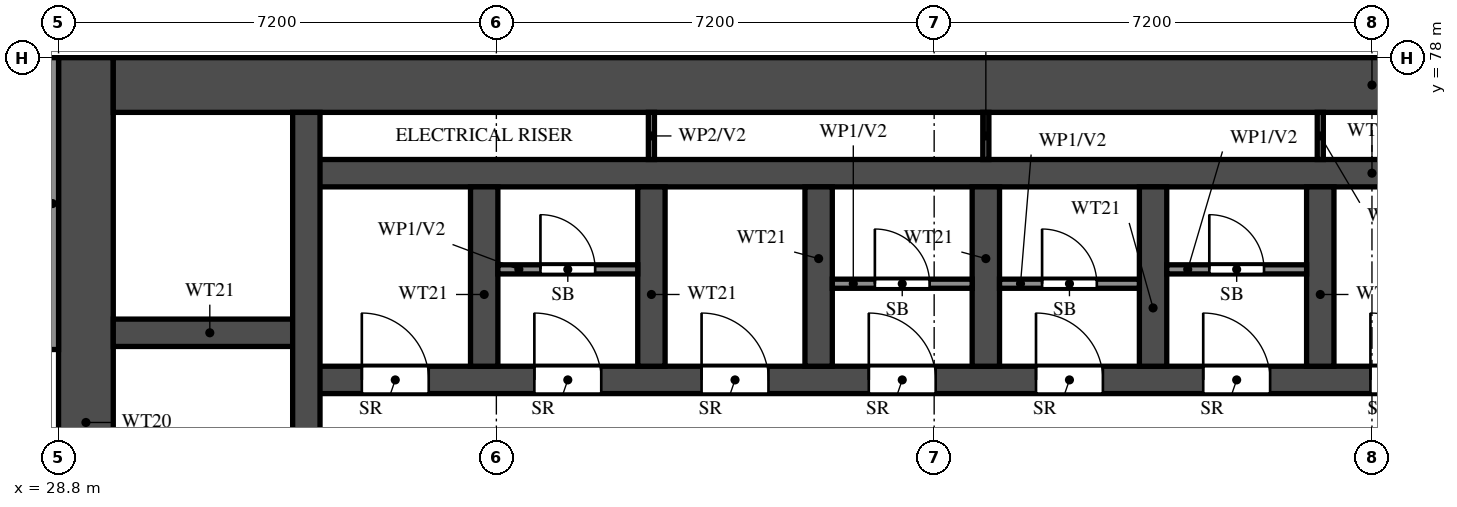
"""IFC4 building model, lengths in metres.
Left out: names, types, materials, properties, quantities, classifications, styles, units other than length and angle.
Written with IfcOpenShell. Run it as: python <this file> out.ifc"""

import sys

from ifc_helpers import new_model, si_unit, direction, frame, frame_2d, origin, place, context, subcontext, project, spatial, rectangle, extrude, element, fill, save


model = new_model("IFC4")
c1 = context("Model", 3, precision=1e-05, world=origin(), true_north=direction((0.0, 1.0)))
c2 = subcontext(c1, "Body", "Model", "MODEL_VIEW")
j1 = project(units=[si_unit("LENGTHUNIT", "METRE"), si_unit("PLANEANGLEUNIT", "RADIAN")], contexts=[c1])
p1 = place(None, origin())
s1 = spatial("IfcSite", under=j1, at=p1, CompositionType="ELEMENT")
p2 = place(p1, origin())
s2 = spatial("IfcBuilding", under=s1, at=p2, CompositionType="ELEMENT")
p3 = place(p2, frame((0.0, 0.0, 79.5)))
s3 = spatial("IfcBuildingStorey", under=s2, at=p3, CompositionType="ELEMENT", Elevation=79.5)
p4 = place(p3, frame((29.25, 66.0, 0.0), z_axis=(0.0, 0.0, 1.0), x_axis=(0.0, 1.0, 0.0)))
e1 = element("IfcWall", 1, at=p4, inside=s3, PredefinedType="SHEAR", context=c2, shape_type="SweptSolid", body=[
    extrude(rectangle(XDim=12.0, YDim=0.9, at=frame_2d((6.0, 0.0))), origin(), (0.0, 0.0, 1.0), 3.18),
])
p5 = place(p3, frame((29.7, 77.55, 0.0), z_axis=(0.0, 0.0, 1.0), x_axis=(1.0, 0.0, 0.0)))
e2 = element("IfcWall", 2, at=p5, inside=s3, PredefinedType="SHEAR", context=c2, shape_type="SweptSolid", body=[
    extrude(rectangle(XDim=41.4, YDim=0.9, at=frame_2d((20.7, 0.0))), origin(), (0.0, 0.0, 1.0), 3.18),
])
p6 = place(p3, frame((32.875, 72.7, 0.0), z_axis=(0.0, 0.0, 1.0), x_axis=(1.0, 0.0, 0.0)))
e3 = element("IfcWall", 3, at=p6, inside=s3, PredefinedType="SHEAR", context=c2, shape_type="SweptSolid", body=[
    extrude(rectangle(XDim=35.05, YDim=0.45, at=frame_2d((17.525, 0.0))), origin(), (0.0, 0.0, 1.0), 3.18),
])
p7 = place(p6, frame((19.8, 0.0, 0.0)))
e4 = element("IfcOpeningElement", 4, at=p7, cuts=e3, PredefinedType="OPENING", context=c2, shape_type="SweptSolid", body=[
    extrude(rectangle(XDim=1.1, YDim=2.1, at=frame_2d((0.55, 1.05))), frame((0.0, 0.235, 0.0), z_axis=(0.0, -1.0, 0.0), x_axis=(1.0, 0.0, 0.0)), (0.0, 0.0, 1.0), 0.47),
])
p8 = place(p6, frame((27.65, 0.0, 0.0)))
e5 = element("IfcOpeningElement", 5, at=p8, cuts=e3, PredefinedType="OPENING", context=c2, shape_type="SweptSolid", body=[
    extrude(rectangle(XDim=1.1, YDim=2.1, at=frame_2d((0.55, 1.05))), frame((0.0, 0.235, 0.0), z_axis=(0.0, -1.0, 0.0), x_axis=(1.0, 0.0, 0.0)), (0.0, 0.0, 1.0), 0.47),
])
p9 = place(p6, frame((30.25, 0.0, 0.0)))
e6 = element("IfcOpeningElement", 6, at=p9, cuts=e3, PredefinedType="OPENING", context=c2, shape_type="SweptSolid", body=[
    extrude(rectangle(XDim=1.1, YDim=2.1, at=frame_2d((0.55, 1.05))), frame((0.0, 0.235, 0.0), z_axis=(0.0, -1.0, 0.0), x_axis=(1.0, 0.0, 0.0)), (0.0, 0.0, 1.0), 0.47),
])
p10 = place(p6, frame((3.75, 0.0, 0.0)))
e7 = element("IfcOpeningElement", 7, at=p10, cuts=e3, PredefinedType="OPENING", context=c2, shape_type="SweptSolid", body=[
    extrude(rectangle(XDim=1.1, YDim=2.1, at=frame_2d((0.55, 1.05))), frame((0.0, 0.235, 0.0), z_axis=(0.0, -1.0, 0.0), x_axis=(1.0, 0.0, 0.0)), (0.0, 0.0, 1.0), 0.47),
])
p11 = place(p6, frame((6.5, 0.0, 0.0)))
e8 = element("IfcOpeningElement", 8, at=p11, cuts=e3, PredefinedType="OPENING", context=c2, shape_type="SweptSolid", body=[
    extrude(rectangle(XDim=1.1, YDim=2.1, at=frame_2d((0.55, 1.05))), frame((0.0, 0.235, 0.0), z_axis=(0.0, -1.0, 0.0), x_axis=(1.0, 0.0, 0.0)), (0.0, 0.0, 1.0), 0.47),
])
p12 = place(p6, frame((9.25, 0.0, 0.0)))
e9 = element("IfcOpeningElement", 9, at=p12, cuts=e3, PredefinedType="OPENING", context=c2, shape_type="SweptSolid", body=[
    extrude(rectangle(XDim=1.1, YDim=2.1, at=frame_2d((0.55, 1.05))), frame((0.0, 0.235, 0.0), z_axis=(0.0, -1.0, 0.0), x_axis=(1.0, 0.0, 0.0)), (0.0, 0.0, 1.0), 0.47),
])
p13 = place(p6, frame((12.0, 0.0, 0.0)))
e10 = element("IfcOpeningElement", 10, at=p13, cuts=e3, PredefinedType="OPENING", context=c2, shape_type="SweptSolid", body=[
    extrude(rectangle(XDim=1.1, YDim=2.1, at=frame_2d((0.55, 1.05))), frame((0.0, 0.235, 0.0), z_axis=(0.0, -1.0, 0.0), x_axis=(1.0, 0.0, 0.0)), (0.0, 0.0, 1.0), 0.47),
])
p14 = place(p6, frame((14.75, 0.0, 0.0)))
e11 = element("IfcOpeningElement", 11, at=p14, cuts=e3, PredefinedType="OPENING", context=c2, shape_type="SweptSolid", body=[
    extrude(rectangle(XDim=1.1, YDim=2.1, at=frame_2d((0.55, 1.05))), frame((0.0, 0.235, 0.0), z_axis=(0.0, -1.0, 0.0), x_axis=(1.0, 0.0, 0.0)), (0.0, 0.0, 1.0), 0.47),
])
p15 = place(p6, frame((17.5, 0.0, 0.0)))
e12 = element("IfcOpeningElement", 12, at=p15, cuts=e3, PredefinedType="OPENING", context=c2, shape_type="SweptSolid", body=[
    extrude(rectangle(XDim=1.1, YDim=2.1, at=frame_2d((0.55, 1.05))), frame((0.0, 0.235, 0.0), z_axis=(0.0, -1.0, 0.0), x_axis=(1.0, 0.0, 0.0)), (0.0, 0.0, 1.0), 0.47),
])
p16 = place(p6, frame((0.913, 0.0, 0.0)))
e13 = element("IfcOpeningElement", 13, at=p16, cuts=e3, PredefinedType="OPENING", context=c2, shape_type="SweptSolid", body=[
    extrude(rectangle(XDim=1.1, YDim=2.1, at=frame_2d((0.55, 1.05))), frame((0.0, 0.235, 0.0), z_axis=(0.0, -1.0, 0.0), x_axis=(1.0, 0.0, 0.0)), (0.0, 0.0, 1.0), 0.47),
])
p17 = place(p3, frame((32.875, 76.1, 0.0), z_axis=(0.0, 0.0, 1.0), x_axis=(1.0, 0.0, 0.0)))
e14 = element("IfcWall", 14, at=p17, inside=s3, PredefinedType="SHEAR", context=c2, shape_type="SweptSolid", body=[
    extrude(rectangle(XDim=35.05, YDim=0.45, at=frame_2d((17.525, 0.0))), origin(), (0.0, 0.0, 1.0), 3.18),
])
p18 = place(p3, frame((29.7, 73.475, 0.0), z_axis=(0.0, 0.0, 1.0), x_axis=(1.0, 0.0, 0.0)))
e15 = element("IfcWall", 15, at=p18, inside=s3, PredefinedType="SHEAR", context=c2, shape_type="SweptSolid", body=[
    extrude(rectangle(XDim=3.175, YDim=0.45, at=frame_2d((1.587, 0.0))), origin(), (0.0, 0.0, 1.0), 3.18),
])
p19 = place(p3, frame((32.875, 66.45, 0.0), z_axis=(0.0, 0.0, 1.0), x_axis=(0.0, 1.0, 0.0)))
e16 = element("IfcWall", 16, at=p19, inside=s3, PredefinedType="SHEAR", context=c2, shape_type="SweptSolid", body=[
    extrude(rectangle(XDim=10.65, YDim=0.45, at=frame_2d((5.325, 0.0))), origin(), (0.0, 0.0, 1.0), 3.18),
])
for number, where, z_axis, x_axis in (
    (17, (35.8, 72.925, 0.0), (0.0, 0.0, 1.0), (0.0, 1.0, 0.0)),
    (18, (38.55, 72.925, 0.0), (0.0, 0.0, 1.0), (0.0, 1.0, 0.0)),
    (19, (41.3, 72.925, 0.0), (0.0, 0.0, 1.0), (0.0, 1.0, 0.0)),
    (20, (44.05, 72.925, 0.0), (0.0, 0.0, 1.0), (0.0, 1.0, 0.0)),
    (21, (46.8, 72.925, 0.0), (0.0, 0.0, 1.0), (0.0, 1.0, 0.0)),
    (22, (49.55, 72.925, 0.0), (0.0, 0.0, 1.0), (0.0, 1.0, 0.0)),
):
    element("IfcWall", number, at=place(p3, frame(where, z_axis=z_axis, x_axis=x_axis)), inside=s3, PredefinedType="SHEAR", context=c2, shape_type="SweptSolid", body=[
        extrude(rectangle(XDim=2.95, YDim=0.45, at=frame_2d((1.475, 0.0))), origin(), (0.0, 0.0, 1.0), 3.18),
    ])
p20 = place(p3, frame((36.025, 74.518, 0.0), z_axis=(0.0, 0.0, 1.0), x_axis=(1.0, 0.0, 0.0)))
e23 = element("IfcWall", 23, at=p20, inside=s3, PredefinedType="PARTITIONING", context=c2, shape_type="SweptSolid", body=[
    extrude(rectangle(XDim=2.3, YDim=0.15, at=frame_2d((1.15, 0.0))), origin(), (0.0, 0.0, 1.0), 3.18),
])
p21 = place(p20, frame((0.7, 0.0, 0.0)))
e24 = element("IfcOpeningElement", 24, at=p21, cuts=e23, PredefinedType="OPENING", context=c2, shape_type="SweptSolid", body=[
    extrude(rectangle(XDim=0.9, YDim=2.1, at=frame_2d((0.45, 1.05))), frame((0.0, 0.085, 0.0), z_axis=(0.0, -1.0, 0.0), x_axis=(1.0, 0.0, 0.0)), (0.0, 0.0, 1.0), 0.17),
])
p22 = place(p3, frame((41.525, 74.282, 0.0), z_axis=(0.0, 0.0, 1.0), x_axis=(1.0, 0.0, 0.0)))
e25 = element("IfcWall", 25, at=p22, inside=s3, PredefinedType="PARTITIONING", context=c2, shape_type="SweptSolid", body=[
    extrude(rectangle(XDim=2.3, YDim=0.15, at=frame_2d((1.15, 0.0))), origin(), (0.0, 0.0, 1.0), 3.18),
])
p23 = place(p22, frame((0.7, 0.0, 0.0)))
e26 = element("IfcOpeningElement", 26, at=p23, cuts=e25, PredefinedType="OPENING", context=c2, shape_type="SweptSolid", body=[
    extrude(rectangle(XDim=0.9, YDim=2.1, at=frame_2d((0.45, 1.05))), frame((0.0, 0.085, 0.0), z_axis=(0.0, -1.0, 0.0), x_axis=(1.0, 0.0, 0.0)), (0.0, 0.0, 1.0), 0.17),
])
p24 = place(p3, frame((44.275, 74.282, 0.0), z_axis=(0.0, 0.0, 1.0), x_axis=(1.0, 0.0, 0.0)))
e27 = element("IfcWall", 27, at=p24, inside=s3, PredefinedType="PARTITIONING", context=c2, shape_type="SweptSolid", body=[
    extrude(rectangle(XDim=2.3, YDim=0.15, at=frame_2d((1.15, 0.0))), origin(), (0.0, 0.0, 1.0), 3.18),
])
p25 = place(p24, frame((0.7, 0.0, 0.0)))
e28 = element("IfcOpeningElement", 28, at=p25, cuts=e27, PredefinedType="OPENING", context=c2, shape_type="SweptSolid", body=[
    extrude(rectangle(XDim=0.9, YDim=2.1, at=frame_2d((0.45, 1.05))), frame((0.0, 0.085, 0.0), z_axis=(0.0, -1.0, 0.0), x_axis=(1.0, 0.0, 0.0)), (0.0, 0.0, 1.0), 0.17),
])
p26 = place(p3, frame((47.025, 74.518, 0.0), z_axis=(0.0, 0.0, 1.0), x_axis=(1.0, 0.0, 0.0)))
e29 = element("IfcWall", 29, at=p26, inside=s3, PredefinedType="PARTITIONING", context=c2, shape_type="SweptSolid", body=[
    extrude(rectangle(XDim=2.3, YDim=0.15, at=frame_2d((1.15, 0.0))), origin(), (0.0, 0.0, 1.0), 3.18),
])
p27 = place(p26, frame((0.7, 0.0, 0.0)))
e30 = element("IfcOpeningElement", 30, at=p27, cuts=e29, PredefinedType="OPENING", context=c2, shape_type="SweptSolid", body=[
    extrude(rectangle(XDim=0.9, YDim=2.1, at=frame_2d((0.45, 1.05))), frame((0.0, 0.085, 0.0), z_axis=(0.0, -1.0, 0.0), x_axis=(1.0, 0.0, 0.0)), (0.0, 0.0, 1.0), 0.17),
])
for number, where, z_axis, x_axis in (
    (31, (38.55, 76.325, 0.0), (0.0, 0.0, 1.0), (0.0, 1.0, 0.0)),
    (32, (44.05, 76.325, 0.0), (0.0, 0.0, 1.0), (0.0, 1.0, 0.0)),
    (33, (49.55, 76.325, 0.0), (0.0, 0.0, 1.0), (0.0, 1.0, 0.0)),
):
    element("IfcWall", number, at=place(p3, frame(where, z_axis=z_axis, x_axis=x_axis)), inside=s3, PredefinedType="PARTITIONING", context=c2, shape_type="SweptSolid", body=[
        extrude(rectangle(XDim=0.775, YDim=0.1, at=frame_2d((0.388, 0.0))), origin(), (0.0, 0.0, 1.0), 3.18),
    ])
p28 = place(p3, frame((28.7, 73.2, 0.0), z_axis=(0.0, 0.0, 1.0), x_axis=(0.0, 1.0, 0.0)))
e34 = element("IfcWall", 34, at=p28, inside=s3, PredefinedType="SOLIDWALL", context=c2, shape_type="SweptSolid", body=[
    extrude(rectangle(XDim=4.8, YDim=0.2, at=frame_2d((2.4, 0.0))), origin(), (0.0, 0.0, 1.0), 3.18),
])
p29 = place(p10, origin())
e35 = element("IfcDoor", 35, at=p29, inside=s3, OperationType="SINGLE_SWING_LEFT", PredefinedType="DOOR", context=c2, shape_type="SweptSolid", body=[
    extrude(rectangle(XDim=1.1, YDim=2.1, at=frame_2d((0.55, 1.05))), frame((0.0, 0.025, 0.0), z_axis=(0.0, -1.0, 0.0), x_axis=(1.0, 0.0, 0.0)), (0.0, 0.0, 1.0), 0.05),
])
fill(e7, e35)
p30 = place(p21, origin())
e36 = element("IfcDoor", 36, at=p30, inside=s3, OperationType="SINGLE_SWING_RIGHT", PredefinedType="DOOR", context=c2, shape_type="SweptSolid", body=[
    extrude(rectangle(XDim=0.9, YDim=2.1, at=frame_2d((0.45, 1.05))), frame((0.0, 0.025, 0.0), z_axis=(0.0, -1.0, 0.0), x_axis=(1.0, 0.0, 0.0)), (0.0, 0.0, 1.0), 0.05),
])
fill(e24, e36)
p31 = place(p11, origin())
e37 = element("IfcDoor", 37, at=p31, inside=s3, OperationType="SINGLE_SWING_LEFT", PredefinedType="DOOR", context=c2, shape_type="SweptSolid", body=[
    extrude(rectangle(XDim=1.1, YDim=2.1, at=frame_2d((0.55, 1.05))), frame((0.0, 0.025, 0.0), z_axis=(0.0, -1.0, 0.0), x_axis=(1.0, 0.0, 0.0)), (0.0, 0.0, 1.0), 0.05),
])
fill(e8, e37)
p32 = place(p12, origin())
e38 = element("IfcDoor", 38, at=p32, inside=s3, OperationType="SINGLE_SWING_LEFT", PredefinedType="DOOR", context=c2, shape_type="SweptSolid", body=[
    extrude(rectangle(XDim=1.1, YDim=2.1, at=frame_2d((0.55, 1.05))), frame((0.0, 0.025, 0.0), z_axis=(0.0, -1.0, 0.0), x_axis=(1.0, 0.0, 0.0)), (0.0, 0.0, 1.0), 0.05),
])
fill(e9, e38)
p33 = place(p23, origin())
e39 = element("IfcDoor", 39, at=p33, inside=s3, OperationType="SINGLE_SWING_LEFT", PredefinedType="DOOR", context=c2, shape_type="SweptSolid", body=[
    extrude(rectangle(XDim=0.9, YDim=2.1, at=frame_2d((0.45, 1.05))), frame((0.0, 0.025, 0.0), z_axis=(0.0, -1.0, 0.0), x_axis=(1.0, 0.0, 0.0)), (0.0, 0.0, 1.0), 0.05),
])
fill(e26, e39)
p34 = place(p13, origin())
e40 = element("IfcDoor", 40, at=p34, inside=s3, OperationType="SINGLE_SWING_LEFT", PredefinedType="DOOR", context=c2, shape_type="SweptSolid", body=[
    extrude(rectangle(XDim=1.1, YDim=2.1, at=frame_2d((0.55, 1.05))), frame((0.0, 0.025, 0.0), z_axis=(0.0, -1.0, 0.0), x_axis=(1.0, 0.0, 0.0)), (0.0, 0.0, 1.0), 0.05),
])
fill(e10, e40)
p35 = place(p25, origin())
e41 = element("IfcDoor", 41, at=p35, inside=s3, OperationType="SINGLE_SWING_RIGHT", PredefinedType="DOOR", context=c2, shape_type="SweptSolid", body=[
    extrude(rectangle(XDim=0.9, YDim=2.1, at=frame_2d((0.45, 1.05))), frame((0.0, 0.025, 0.0), z_axis=(0.0, -1.0, 0.0), x_axis=(1.0, 0.0, 0.0)), (0.0, 0.0, 1.0), 0.05),
])
fill(e28, e41)
p36 = place(p14, origin())
e42 = element("IfcDoor", 42, at=p36, inside=s3, OperationType="SINGLE_SWING_LEFT", PredefinedType="DOOR", context=c2, shape_type="SweptSolid", body=[
    extrude(rectangle(XDim=1.1, YDim=2.1, at=frame_2d((0.55, 1.05))), frame((0.0, 0.025, 0.0), z_axis=(0.0, -1.0, 0.0), x_axis=(1.0, 0.0, 0.0)), (0.0, 0.0, 1.0), 0.05),
])
fill(e11, e42)
p37 = place(p27, origin())
e43 = element("IfcDoor", 43, at=p37, inside=s3, OperationType="SINGLE_SWING_RIGHT", PredefinedType="DOOR", context=c2, shape_type="SweptSolid", body=[
    extrude(rectangle(XDim=0.9, YDim=2.1, at=frame_2d((0.45, 1.05))), frame((0.0, 0.025, 0.0), z_axis=(0.0, -1.0, 0.0), x_axis=(1.0, 0.0, 0.0)), (0.0, 0.0, 1.0), 0.05),
])
fill(e30, e43)
p38 = place(p15, origin())
e44 = element("IfcDoor", 44, at=p38, inside=s3, OperationType="SINGLE_SWING_LEFT", PredefinedType="DOOR", context=c2, shape_type="SweptSolid", body=[
    extrude(rectangle(XDim=1.1, YDim=2.1, at=frame_2d((0.55, 1.05))), frame((0.0, 0.025, 0.0), z_axis=(0.0, -1.0, 0.0), x_axis=(1.0, 0.0, 0.0)), (0.0, 0.0, 1.0), 0.05),
])
fill(e12, e44)
p39 = place(p16, origin())
e45 = element("IfcDoor", 45, at=p39, inside=s3, OperationType="SINGLE_SWING_LEFT", PredefinedType="DOOR", context=c2, shape_type="SweptSolid", body=[
    extrude(rectangle(XDim=1.1, YDim=2.1, at=frame_2d((0.55, 1.05))), frame((0.0, 0.025, 0.0), z_axis=(0.0, -1.0, 0.0), x_axis=(1.0, 0.0, 0.0)), (0.0, 0.0, 1.0), 0.05),
])
fill(e13, e45)
save(model, sys.argv[1])
